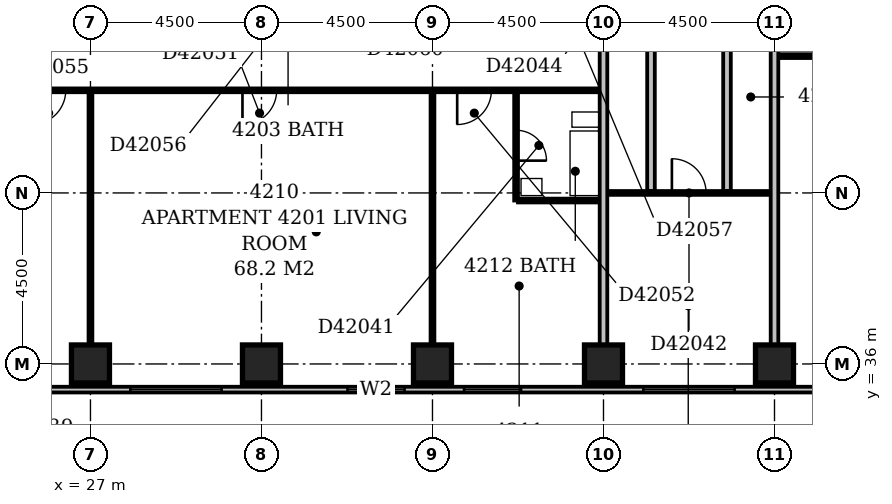
"""IFC4 building model, lengths in metres.
Left out: names, types, materials, properties, quantities, classifications, styles, units other than length and angle.
Written with IfcOpenShell. Run it as: python <this file> out.ifc"""

import sys

from ifc_helpers import new_model, si_unit, direction, frame, frame_2d, origin, origin_2d, place, context, subcontext, project, spatial, rectangle, extrude, element, fill, save


model = new_model("IFC4")
c1 = context("Model", 3, precision=1e-05, world=origin(), true_north=direction((0.0, 1.0)))
c2 = subcontext(c1, "Body", "Model", "MODEL_VIEW")
j1 = project(units=[si_unit("LENGTHUNIT", "METRE"), si_unit("PLANEANGLEUNIT", "RADIAN")], contexts=[c1])
p1 = place(None, origin())
s1 = spatial("IfcSite", under=j1, at=p1, CompositionType="ELEMENT")
p2 = place(p1, origin())
s2 = spatial("IfcBuilding", under=s1, at=p2, CompositionType="ELEMENT")
p3 = place(p2, frame((0.0, 0.0, 166.4)))
s3 = spatial("IfcBuildingStorey", under=s2, at=p3, CompositionType="ELEMENT", Elevation=166.4)
for number, where, z_axis, x_axis in (
    (1, (27.0, 36.0, -0.3), (0.0, 0.0, 1.0), (1.0, 0.0, 0.0)),
    (2, (31.5, 36.0, -0.3), (0.0, 0.0, 1.0), (1.0, 0.0, 0.0)),
    (3, (36.0, 36.0, -0.3), (0.0, 0.0, 1.0), (1.0, 0.0, 0.0)),
    (4, (40.5, 36.0, -0.3), (0.0, 0.0, 1.0), (1.0, 0.0, 0.0)),
    (5, (45.0, 36.0, -0.3), (0.0, 0.0, 1.0), (1.0, 0.0, 0.0)),
):
    element("IfcColumn", number, at=place(p3, frame(where, z_axis=z_axis, x_axis=x_axis)), inside=s3, PredefinedType="COLUMN", context=c2, shape_type="SweptSolid", body=[
        extrude(rectangle(XDim=1.0, YDim=1.0, at=origin_2d()), origin(), (0.0, 0.0, 1.0), 3.6),
    ])
p4 = place(p3, frame((23.1, 35.325, 0.0), z_axis=(0.0, 0.0, 1.0), x_axis=(1.0, 0.0, 0.0)))
e6 = element("IfcWall", 6, at=p4, inside=s3, PredefinedType="STANDARD", context=c2, shape_type="SweptSolid", body=[
    extrude(rectangle(XDim=45.15, YDim=0.15, at=frame_2d((22.575, 0.0))), origin(), (0.0, 0.0, 1.0), 2.7),
])
p5 = place(p4, frame((0.45, 0.0, 0.6)))
e7 = element("IfcOpeningElement", 7, at=p5, cuts=e6, PredefinedType="OPENING", context=c2, shape_type="SweptSolid", body=[
    extrude(rectangle(XDim=2.4, YDim=1.8, at=frame_2d((1.2, 0.9))), frame((0.0, 0.087, 0.0), z_axis=(0.0, -1.0, 0.0), x_axis=(1.0, 0.0, 0.0)), (0.0, 0.0, 1.0), 0.174),
])
p6 = place(p4, frame((4.95, 0.0, 0.6)))
e8 = element("IfcOpeningElement", 8, at=p6, cuts=e6, PredefinedType="OPENING", context=c2, shape_type="SweptSolid", body=[
    extrude(rectangle(XDim=2.4, YDim=1.8, at=frame_2d((1.2, 0.9))), frame((0.0, 0.087, 0.0), z_axis=(0.0, -1.0, 0.0), x_axis=(1.0, 0.0, 0.0)), (0.0, 0.0, 1.0), 0.174),
])
p7 = place(p4, frame((10.665, 0.0, 0.6)))
e9 = element("IfcOpeningElement", 9, at=p7, cuts=e6, PredefinedType="OPENING", context=c2, shape_type="SweptSolid", body=[
    extrude(rectangle(XDim=1.5, YDim=1.8, at=frame_2d((0.75, 0.9))), frame((0.0, 0.087, 0.0), z_axis=(0.0, -1.0, 0.0), x_axis=(1.0, 0.0, 0.0)), (0.0, 0.0, 1.0), 0.174),
])
p8 = place(p4, frame((13.731, 0.0, 0.6)))
e10 = element("IfcOpeningElement", 10, at=p8, cuts=e6, PredefinedType="OPENING", context=c2, shape_type="SweptSolid", body=[
    extrude(rectangle(XDim=1.5, YDim=1.8, at=frame_2d((0.75, 0.9))), frame((0.0, 0.087, 0.0), z_axis=(0.0, -1.0, 0.0), x_axis=(1.0, 0.0, 0.0)), (0.0, 0.0, 1.0), 0.174),
])
p9 = place(p4, frame((18.45, 0.0, 0.6)))
e11 = element("IfcOpeningElement", 11, at=p9, cuts=e6, PredefinedType="OPENING", context=c2, shape_type="SweptSolid", body=[
    extrude(rectangle(XDim=2.4, YDim=1.8, at=frame_2d((1.2, 0.9))), frame((0.0, 0.087, 0.0), z_axis=(0.0, -1.0, 0.0), x_axis=(1.0, 0.0, 0.0)), (0.0, 0.0, 1.0), 0.174),
])
p10 = place(p4, frame((22.95, 0.0, 0.6)))
e12 = element("IfcOpeningElement", 12, at=p10, cuts=e6, PredefinedType="OPENING", context=c2, shape_type="SweptSolid", body=[
    extrude(rectangle(XDim=2.4, YDim=1.8, at=frame_2d((1.2, 0.9))), frame((0.0, 0.087, 0.0), z_axis=(0.0, -1.0, 0.0), x_axis=(1.0, 0.0, 0.0)), (0.0, 0.0, 1.0), 0.174),
])
p11 = place(p4, frame((27.45, 0.0, 0.6)))
e13 = element("IfcOpeningElement", 13, at=p11, cuts=e6, PredefinedType="OPENING", context=c2, shape_type="SweptSolid", body=[
    extrude(rectangle(XDim=2.4, YDim=1.8, at=frame_2d((1.2, 0.9))), frame((0.0, 0.087, 0.0), z_axis=(0.0, -1.0, 0.0), x_axis=(1.0, 0.0, 0.0)), (0.0, 0.0, 1.0), 0.174),
])
p12 = place(p4, frame((31.95, 0.0, 0.6)))
e14 = element("IfcOpeningElement", 14, at=p12, cuts=e6, PredefinedType="OPENING", context=c2, shape_type="SweptSolid", body=[
    extrude(rectangle(XDim=2.4, YDim=1.8, at=frame_2d((1.2, 0.9))), frame((0.0, 0.087, 0.0), z_axis=(0.0, -1.0, 0.0), x_axis=(1.0, 0.0, 0.0)), (0.0, 0.0, 1.0), 0.174),
])
p13 = place(p4, frame((36.45, 0.0, 0.6)))
e15 = element("IfcOpeningElement", 15, at=p13, cuts=e6, PredefinedType="OPENING", context=c2, shape_type="SweptSolid", body=[
    extrude(rectangle(XDim=2.4, YDim=1.8, at=frame_2d((1.2, 0.9))), frame((0.0, 0.087, 0.0), z_axis=(0.0, -1.0, 0.0), x_axis=(1.0, 0.0, 0.0)), (0.0, 0.0, 1.0), 0.174),
])
p14 = place(p4, frame((41.172, 0.0, 0.6)))
e16 = element("IfcOpeningElement", 16, at=p14, cuts=e6, PredefinedType="OPENING", context=c2, shape_type="SweptSolid", body=[
    extrude(rectangle(XDim=2.4, YDim=1.8, at=frame_2d((1.2, 0.9))), frame((0.0, 0.087, 0.0), z_axis=(0.0, -1.0, 0.0), x_axis=(1.0, 0.0, 0.0)), (0.0, 0.0, 1.0), 0.174),
])
p15 = place(p3, frame((27.0, 36.5, 0.0), z_axis=(0.0, 0.0, 1.0), x_axis=(0.0, 1.0, 0.0)))
e17 = element("IfcWall", 17, at=p15, inside=s3, PredefinedType="PARTITIONING", context=c2, shape_type="SweptSolid", body=[
    extrude(rectangle(XDim=6.65, YDim=0.1, at=frame_2d((3.325, 0.0))), origin(), (0.0, 0.0, 1.0), 2.6),
])
p16 = place(p3, frame((36.0, 36.5, 0.0), z_axis=(0.0, 0.0, 1.0), x_axis=(0.0, 1.0, 0.0)))
e18 = element("IfcWall", 18, at=p16, inside=s3, PredefinedType="PARTITIONING", context=c2, shape_type="SweptSolid", body=[
    extrude(rectangle(XDim=6.65, YDim=0.1, at=frame_2d((3.325, 0.0))), origin(), (0.0, 0.0, 1.0), 2.4),
])
p17 = place(p3, frame((40.5, 36.5, 0.0), z_axis=(0.0, 0.0, 1.0), x_axis=(0.0, 1.0, 0.0)))
e19 = element("IfcWall", 19, at=p17, inside=s3, PredefinedType="PARTITIONING", context=c2, shape_type="SweptSolid", body=[
    extrude(rectangle(XDim=12.9, YDim=0.2, at=frame_2d((6.45, 0.0))), origin(), (0.0, 0.0, 1.0), 3.3),
])
p18 = place(p3, frame((45.0, 36.5, 0.0), z_axis=(0.0, 0.0, 1.0), x_axis=(0.0, 1.0, 0.0)))
e20 = element("IfcWall", 20, at=p18, inside=s3, PredefinedType="PARTITIONING", context=c2, shape_type="SweptSolid", body=[
    extrude(rectangle(XDim=12.9, YDim=0.2, at=frame_2d((6.45, 0.0))), origin(), (0.0, 0.0, 1.0), 2.6),
])
p19 = place(p3, frame((38.2, 40.3, 0.0), z_axis=(0.0, 0.0, 1.0), x_axis=(0.0, 1.0, 0.0)))
e21 = element("IfcWall", 21, at=p19, inside=s3, PredefinedType="PLUMBINGWALL", context=c2, shape_type="SweptSolid", body=[
    extrude(rectangle(XDim=2.85, YDim=0.1, at=frame_2d((1.425, 0.0))), origin(), (0.0, 0.0, 1.0), 3.3),
])
p20 = place(p19, frame((1.05, 0.0, 0.0)))
e22 = element("IfcOpeningElement", 22, at=p20, cuts=e21, PredefinedType="OPENING", context=c2, shape_type="SweptSolid", body=[
    extrude(rectangle(XDim=0.8, YDim=2.1, at=frame_2d((0.4, 1.05))), frame((0.0, 0.062, 0.0), z_axis=(0.0, -1.0, 0.0), x_axis=(1.0, 0.0, 0.0)), (0.0, 0.0, 1.0), 0.124),
])
p21 = place(p3, frame((38.25, 40.3, 0.0), z_axis=(0.0, 0.0, 1.0), x_axis=(1.0, 0.0, 0.0)))
e23 = element("IfcWall", 23, at=p21, inside=s3, PredefinedType="PLUMBINGWALL", context=c2, shape_type="SweptSolid", body=[
    extrude(rectangle(XDim=2.15, YDim=0.1, at=frame_2d((1.075, 0.0))), origin(), (0.0, 0.0, 1.0), 3.3),
])
p22 = place(p3, frame((40.6, 40.5, 0.0), z_axis=(0.0, 0.0, 1.0), x_axis=(1.0, 0.0, 0.0)))
e24 = element("IfcWall", 24, at=p22, inside=s3, PredefinedType="PARTITIONING", context=c2, shape_type="SweptSolid", body=[
    extrude(rectangle(XDim=4.3, YDim=0.1, at=frame_2d((2.15, 0.0))), origin(), (0.0, 0.0, 1.0), 3.3),
])
p23 = place(p22, frame((1.7, 0.0, 0.0)))
e25 = element("IfcOpeningElement", 25, at=p23, cuts=e24, PredefinedType="OPENING", context=c2, shape_type="SweptSolid", body=[
    extrude(rectangle(XDim=0.9, YDim=2.1, at=frame_2d((0.45, 1.05))), frame((0.0, 0.062, 0.0), z_axis=(0.0, -1.0, 0.0), x_axis=(1.0, 0.0, 0.0)), (0.0, 0.0, 1.0), 0.124),
])
p24 = place(p3, frame((41.75, 40.55, 0.0), z_axis=(0.0, 0.0, 1.0), x_axis=(0.0, 1.0, 0.0)))
e26 = element("IfcWall", 26, at=p24, inside=s3, PredefinedType="PARTITIONING", context=c2, shape_type="SweptSolid", body=[
    extrude(rectangle(XDim=8.95, YDim=0.2, at=frame_2d((4.475, 0.0))), origin(), (0.0, 0.0, 1.0), 3.3),
])
p25 = place(p24, frame((5.55, 0.0, 0.0)))
e27 = element("IfcOpeningElement", 27, at=p25, cuts=e26, PredefinedType="OPENING", context=c2, shape_type="SweptSolid", body=[
    extrude(rectangle(XDim=0.8, YDim=2.1, at=frame_2d((0.4, 1.05))), frame((0.0, 0.112, 0.0), z_axis=(0.0, -1.0, 0.0), x_axis=(1.0, 0.0, 0.0)), (0.0, 0.0, 1.0), 0.224),
])
p26 = place(p3, frame((43.75, 40.55, 0.0), z_axis=(0.0, 0.0, 1.0), x_axis=(0.0, 1.0, 0.0)))
e28 = element("IfcWall", 28, at=p26, inside=s3, PredefinedType="PARTITIONING", context=c2, shape_type="SweptSolid", body=[
    extrude(rectangle(XDim=8.95, YDim=0.2, at=frame_2d((4.475, 0.0))), origin(), (0.0, 0.0, 1.0), 3.3),
])
p27 = place(p26, frame((5.55, 0.0, 0.0)))
e29 = element("IfcOpeningElement", 29, at=p27, cuts=e28, PredefinedType="OPENING", context=c2, shape_type="SweptSolid", body=[
    extrude(rectangle(XDim=0.8, YDim=2.1, at=frame_2d((0.4, 1.05))), frame((0.0, 0.112, 0.0), z_axis=(0.0, -1.0, 0.0), x_axis=(1.0, 0.0, 0.0)), (0.0, 0.0, 1.0), 0.224),
])
p28 = place(p3, frame((22.6, 43.2, 0.0), z_axis=(0.0, 0.0, 1.0), x_axis=(1.0, 0.0, 0.0)))
e30 = element("IfcWall", 30, at=p28, inside=s3, PredefinedType="PARTITIONING", context=c2, shape_type="SweptSolid", body=[
    extrude(rectangle(XDim=17.8, YDim=0.1, at=frame_2d((8.9, 0.0))), origin(), (0.0, 0.0, 1.0), 3.3),
])
p29 = place(p28, frame((2.85, 0.0, 0.0)))
e31 = element("IfcOpeningElement", 31, at=p29, cuts=e30, PredefinedType="OPENING", context=c2, shape_type="SweptSolid", body=[
    extrude(rectangle(XDim=0.9, YDim=2.1, at=frame_2d((0.45, 1.05))), frame((0.0, 0.062, 0.0), z_axis=(0.0, -1.0, 0.0), x_axis=(1.0, 0.0, 0.0)), (0.0, 0.0, 1.0), 0.124),
])
p30 = place(p28, frame((8.4, 0.0, 0.0)))
e32 = element("IfcOpeningElement", 32, at=p30, cuts=e30, PredefinedType="OPENING", context=c2, shape_type="SweptSolid", body=[
    extrude(rectangle(XDim=0.9, YDim=2.1, at=frame_2d((0.45, 1.05))), frame((0.0, 0.062, 0.0), z_axis=(0.0, -1.0, 0.0), x_axis=(1.0, 0.0, 0.0)), (0.0, 0.0, 1.0), 0.124),
])
p31 = place(p28, frame((14.05, 0.0, 0.0)))
e33 = element("IfcOpeningElement", 33, at=p31, cuts=e30, PredefinedType="OPENING", context=c2, shape_type="SweptSolid", body=[
    extrude(rectangle(XDim=0.9, YDim=2.1, at=frame_2d((0.45, 1.05))), frame((0.0, 0.062, 0.0), z_axis=(0.0, -1.0, 0.0), x_axis=(1.0, 0.0, 0.0)), (0.0, 0.0, 1.0), 0.124),
])
p32 = place(p3, frame((45.1, 44.1, 0.0), z_axis=(0.0, 0.0, 1.0), x_axis=(1.0, 0.0, 0.0)))
e34 = element("IfcWall", 34, at=p32, inside=s3, PredefinedType="PARTITIONING", context=c2, shape_type="SweptSolid", body=[
    extrude(rectangle(XDim=8.8, YDim=0.1, at=frame_2d((4.4, 0.0))), origin(), (0.0, 0.0, 1.0), 3.3),
])
p33 = place(p32, frame((1.7, 0.0, 0.0)))
e35 = element("IfcOpeningElement", 35, at=p33, cuts=e34, PredefinedType="OPENING", context=c2, shape_type="SweptSolid", body=[
    extrude(rectangle(XDim=0.9, YDim=2.1, at=frame_2d((0.45, 1.05))), frame((0.0, 0.062, 0.0), z_axis=(0.0, -1.0, 0.0), x_axis=(1.0, 0.0, 0.0)), (0.0, 0.0, 1.0), 0.124),
])
p34 = place(p32, frame((6.2, 0.0, 0.0)))
e36 = element("IfcOpeningElement", 36, at=p34, cuts=e34, PredefinedType="OPENING", context=c2, shape_type="SweptSolid", body=[
    extrude(rectangle(XDim=0.9, YDim=2.1, at=frame_2d((0.45, 1.05))), frame((0.0, 0.062, 0.0), z_axis=(0.0, -1.0, 0.0), x_axis=(1.0, 0.0, 0.0)), (0.0, 0.0, 1.0), 0.124),
])
p35 = place(p6, origin())
e37 = element("IfcWindow", 37, at=p35, inside=s3, PartitioningType="SINGLE_PANEL", PredefinedType="WINDOW", context=c2, shape_type="SweptSolid", body=[
    extrude(rectangle(XDim=2.4, YDim=1.8, at=frame_2d((1.2, 0.9))), frame((0.0, 0.03, 0.0), z_axis=(0.0, -1.0, 0.0), x_axis=(1.0, 0.0, 0.0)), (0.0, 0.0, 1.0), 0.06),
])
fill(e8, e37)
p36 = place(p7, origin())
e38 = element("IfcWindow", 38, at=p36, inside=s3, PartitioningType="SINGLE_PANEL", PredefinedType="WINDOW", context=c2, shape_type="SweptSolid", body=[
    extrude(rectangle(XDim=1.5, YDim=1.8, at=frame_2d((0.75, 0.9))), frame((0.0, 0.03, 0.0), z_axis=(0.0, -1.0, 0.0), x_axis=(1.0, 0.0, 0.0)), (0.0, 0.0, 1.0), 0.06),
])
fill(e9, e38)
p37 = place(p8, origin())
e39 = element("IfcWindow", 39, at=p37, inside=s3, PartitioningType="SINGLE_PANEL", PredefinedType="WINDOW", context=c2, shape_type="SweptSolid", body=[
    extrude(rectangle(XDim=1.5, YDim=1.8, at=frame_2d((0.75, 0.9))), frame((0.0, 0.03, 0.0), z_axis=(0.0, -1.0, 0.0), x_axis=(1.0, 0.0, 0.0)), (0.0, 0.0, 1.0), 0.06),
])
fill(e10, e39)
p38 = place(p9, origin())
e40 = element("IfcWindow", 40, at=p38, inside=s3, PartitioningType="SINGLE_PANEL", PredefinedType="WINDOW", context=c2, shape_type="SweptSolid", body=[
    extrude(rectangle(XDim=2.4, YDim=1.8, at=frame_2d((1.2, 0.9))), frame((0.0, 0.03, 0.0), z_axis=(0.0, -1.0, 0.0), x_axis=(1.0, 0.0, 0.0)), (0.0, 0.0, 1.0), 0.06),
])
fill(e11, e40)
p39 = place(p20, frame((0.8, 0.0, 0.0), z_axis=(0.0, 0.0, 1.0), x_axis=(-1.0, 0.0, 0.0)))
e41 = element("IfcDoor", 41, at=p39, inside=s3, OperationType="SINGLE_SWING_RIGHT", PredefinedType="DOOR", context=c2, shape_type="SweptSolid", body=[
    extrude(rectangle(XDim=0.8, YDim=2.1, at=frame_2d((0.4, 1.05))), frame((0.0, 0.025, 0.0), z_axis=(0.0, -1.0, 0.0), x_axis=(1.0, 0.0, 0.0)), (0.0, 0.0, 1.0), 0.05),
])
fill(e22, e41)
p40 = place(p23, origin())
e42 = element("IfcDoor", 42, at=p40, inside=s3, OperationType="SINGLE_SWING_LEFT", PredefinedType="DOOR", context=c2, shape_type="SweptSolid", body=[
    extrude(rectangle(XDim=0.9, YDim=2.1, at=frame_2d((0.45, 1.05))), frame((0.0, 0.025, 0.0), z_axis=(0.0, -1.0, 0.0), x_axis=(1.0, 0.0, 0.0)), (0.0, 0.0, 1.0), 0.05),
])
fill(e25, e42)
p41 = place(p29, frame((0.9, 0.0, 0.0), z_axis=(0.0, 0.0, 1.0), x_axis=(-1.0, 0.0, 0.0)))
e43 = element("IfcDoor", 43, at=p41, inside=s3, OperationType="SINGLE_SWING_RIGHT", PredefinedType="DOOR", context=c2, shape_type="SweptSolid", body=[
    extrude(rectangle(XDim=0.9, YDim=2.1, at=frame_2d((0.45, 1.05))), frame((0.0, 0.025, 0.0), z_axis=(0.0, -1.0, 0.0), x_axis=(1.0, 0.0, 0.0)), (0.0, 0.0, 1.0), 0.05),
])
fill(e31, e43)
p42 = place(p30, frame((0.9, 0.0, 0.0), z_axis=(0.0, 0.0, 1.0), x_axis=(-1.0, 0.0, 0.0)))
e44 = element("IfcDoor", 44, at=p42, inside=s3, OperationType="SINGLE_SWING_RIGHT", PredefinedType="DOOR", context=c2, shape_type="SweptSolid", body=[
    extrude(rectangle(XDim=0.9, YDim=2.1, at=frame_2d((0.45, 1.05))), frame((0.0, 0.025, 0.0), z_axis=(0.0, -1.0, 0.0), x_axis=(1.0, 0.0, 0.0)), (0.0, 0.0, 1.0), 0.05),
])
fill(e32, e44)
p43 = place(p31, frame((0.9, 0.0, 0.0), z_axis=(0.0, 0.0, 1.0), x_axis=(-1.0, 0.0, 0.0)))
e45 = element("IfcDoor", 45, at=p43, inside=s3, OperationType="SINGLE_SWING_RIGHT", PredefinedType="DOOR", context=c2, shape_type="SweptSolid", body=[
    extrude(rectangle(XDim=0.9, YDim=2.1, at=frame_2d((0.45, 1.05))), frame((0.0, 0.025, 0.0), z_axis=(0.0, -1.0, 0.0), x_axis=(1.0, 0.0, 0.0)), (0.0, 0.0, 1.0), 0.05),
])
fill(e33, e45)
save(model, sys.argv[1])
